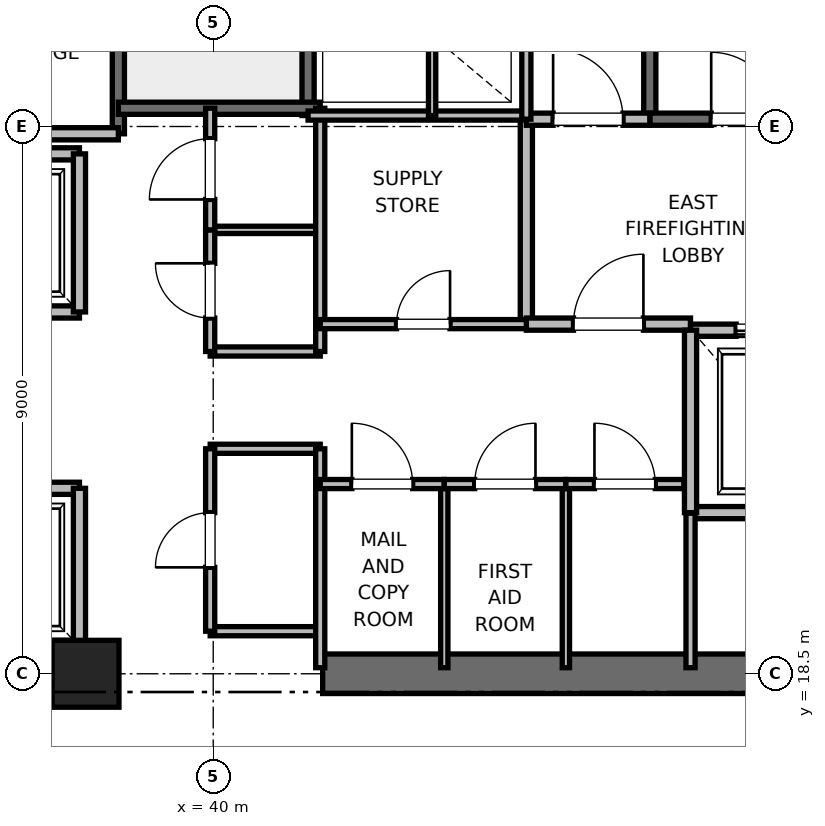
"""IFC4 building model, lengths in metres.
Left out: names, types, materials, properties, quantities, classifications, styles, units other than length and angle.
Written with IfcOpenShell. Run it as: python <this file> out.ifc"""

import sys

from ifc_helpers import new_model, si_unit, direction, frame, frame_2d, origin, origin_2d, place, context, subcontext, project, spatial, rectangle, extrude, element, fill, save


model = new_model("IFC4")
c1 = context("Model", 3, precision=1e-05, world=origin(), true_north=direction((0.0, 1.0)))
c2 = subcontext(c1, "Body", "Model", "MODEL_VIEW")
j1 = project(units=[si_unit("LENGTHUNIT", "METRE"), si_unit("PLANEANGLEUNIT", "RADIAN")], contexts=[c1])
p1 = place(None, origin())
s1 = spatial("IfcSite", under=j1, at=p1, CompositionType="ELEMENT")
p2 = place(p1, origin())
s2 = spatial("IfcBuilding", under=s1, at=p2, CompositionType="ELEMENT")
p3 = place(p2, frame((0.0, 0.0, 99.6)))
s3 = spatial("IfcBuildingStorey", under=s2, at=p3, CompositionType="ELEMENT", Elevation=99.6)
p4 = place(p3, frame((37.9, 18.5, 0.0), z_axis=(0.0, 0.0, 1.0), x_axis=(1.0, 0.0, 0.0)))
e1 = element("IfcColumn", 1, at=p4, inside=s3, PredefinedType="PILASTER", context=c2, shape_type="SweptSolid", body=[
    extrude(rectangle(XDim=1.1, YDim=1.1, at=origin_2d()), origin(), (0.0, 0.0, 1.0), 4.0),
])
for number, where, z_axis, x_axis in (
    (2, (29.0, 18.5, 0.0), (0.0, 0.0, 1.0), (1.0, 0.0, 0.0)),
    (3, (41.8, 18.5, 0.0), (0.0, 0.0, 1.0), (1.0, 0.0, 0.0)),
):
    element("IfcWall", number, at=place(p3, frame(where, z_axis=z_axis, x_axis=x_axis)), inside=s3, PredefinedType="SHEAR", context=c2, shape_type="SweptSolid", body=[
        extrude(rectangle(XDim=9.2, YDim=0.65, at=frame_2d((4.6, 0.0))), origin(), (0.0, 0.0, 1.0), 3.76),
    ])
p5 = place(p3, frame((47.18, 27.62, 0.0), z_axis=(0.0, 0.0, 1.0), x_axis=(0.0, 1.0, 0.0)))
e4 = element("IfcWall", 4, at=p5, inside=s3, PredefinedType="SOLIDWALL", context=c2, shape_type="SweptSolid", body=[
    extrude(rectangle(XDim=8.18, YDim=0.2, at=frame_2d((4.09, 0.0))), origin(), (0.0, 0.0, 1.0), 3.76),
])
p6 = place(p3, frame((47.18, 27.62, 0.0), z_axis=(0.0, 0.0, 1.0), x_axis=(1.0, 0.0, 0.0)))
e5 = element("IfcWall", 5, at=p6, inside=s3, PredefinedType="SOLIDWALL", context=c2, shape_type="SweptSolid", body=[
    extrude(rectangle(XDim=3.12, YDim=0.2, at=frame_2d((1.56, 0.0))), origin(), (0.0, 0.0, 1.0), 3.76),
])
p7 = place(p6, frame((1.01, 0.0, 0.0)))
e6 = element("IfcOpeningElement", 6, at=p7, cuts=e5, PredefinedType="OPENING", context=c2, shape_type="SweptSolid", body=[
    extrude(rectangle(XDim=1.1, YDim=2.15, at=frame_2d((0.55, 1.075))), frame((0.0, 0.1, 0.0), z_axis=(0.0, -1.0, 0.0), x_axis=(1.0, 0.0, 0.0)), (0.0, 0.0, 1.0), 0.2),
])
p8 = place(p3, frame((38.44, 27.38, 0.0), z_axis=(0.0, 0.0, 1.0), x_axis=(0.0, 1.0, 0.0)))
e7 = element("IfcWall", 7, at=p8, inside=s3, PredefinedType="SOLIDWALL", context=c2, shape_type="SweptSolid", body=[
    extrude(rectangle(XDim=8.87, YDim=0.2, at=frame_2d((4.435, 0.0))), origin(), (0.0, 0.0, 1.0), 3.76),
])
p9 = place(p3, frame((41.56, 27.68, 0.0), z_axis=(0.0, 0.0, 1.0), x_axis=(0.0, 1.0, 0.0)))
e8 = element("IfcWall", 8, at=p9, inside=s3, PredefinedType="SOLIDWALL", context=c2, shape_type="SweptSolid", body=[
    extrude(rectangle(XDim=8.57, YDim=0.2, at=frame_2d((4.285, 0.0))), origin(), (0.0, 0.0, 1.0), 3.76),
])
p10 = place(p3, frame((38.44, 27.8, 0.0), z_axis=(0.0, 0.0, 1.0), x_axis=(1.0, 0.0, 0.0)))
e9 = element("IfcWall", 9, at=p10, inside=s3, PredefinedType="SOLIDWALL", context=c2, shape_type="SweptSolid", body=[
    extrude(rectangle(XDim=3.32, YDim=0.2, at=frame_2d((1.66, 0.0))), origin(), (0.0, 0.0, 1.0), 3.76),
])
p11 = place(p3, frame((32.82, 27.38, 0.0), z_axis=(0.0, 0.0, 1.0), x_axis=(1.0, 0.0, 0.0)))
e10 = element("IfcWall", 10, at=p11, inside=s3, PredefinedType="PARTITIONING", context=c2, shape_type="SweptSolid", body=[
    extrude(rectangle(XDim=5.62, YDim=0.2, at=frame_2d((2.81, 0.0))), origin(), (0.0, 0.0, 1.0), 3.76),
])
p12 = place(p3, frame((45.15, 24.25, 0.0), z_axis=(0.0, 0.0, 1.0), x_axis=(0.0, 1.0, 0.0)))
e11 = element("IfcWall", 11, at=p12, inside=s3, PredefinedType="PARTITIONING", context=c2, shape_type="SweptSolid", body=[
    extrude(rectangle(XDim=3.37, YDim=0.2, at=frame_2d((1.685, 0.0))), origin(), (0.0, 0.0, 1.0), 3.76),
])
p13 = place(p3, frame((45.15, 24.25, 0.0), z_axis=(0.0, 0.0, 1.0), x_axis=(1.0, 0.0, 0.0)))
e12 = element("IfcWall", 12, at=p13, inside=s3, PredefinedType="PARTITIONING", context=c2, shape_type="SweptSolid", body=[
    extrude(rectangle(XDim=2.7, YDim=0.2, at=frame_2d((1.35, 0.0))), origin(), (0.0, 0.0, 1.0), 3.76),
])
p14 = place(p13, frame((0.775, 0.0, 0.0)))
e13 = element("IfcOpeningElement", 13, at=p14, cuts=e12, PredefinedType="OPENING", context=c2, shape_type="SweptSolid", body=[
    extrude(rectangle(XDim=1.15, YDim=2.2, at=frame_2d((0.575, 1.1))), frame((0.0, 0.1, 0.0), z_axis=(0.0, -1.0, 0.0), x_axis=(1.0, 0.0, 0.0)), (0.0, 0.0, 1.0), 0.2),
])
p15 = place(p3, frame((45.15, 27.62, 0.0), z_axis=(0.0, 0.0, 1.0), x_axis=(1.0, 0.0, 0.0)))
e14 = element("IfcWall", 14, at=p15, inside=s3, PredefinedType="PARTITIONING", context=c2, shape_type="SweptSolid", body=[
    extrude(rectangle(XDim=2.03, YDim=0.2, at=frame_2d((1.015, 0.0))), origin(), (0.0, 0.0, 1.0), 3.76),
])
p16 = place(p15, frame((0.44, 0.0, 0.0)))
e15 = element("IfcOpeningElement", 15, at=p16, cuts=e14, PredefinedType="OPENING", context=c2, shape_type="SweptSolid", body=[
    extrude(rectangle(XDim=1.15, YDim=2.2, at=frame_2d((0.575, 1.1))), frame((0.0, 0.1, 0.0), z_axis=(0.0, -1.0, 0.0), x_axis=(1.0, 0.0, 0.0)), (0.0, 0.0, 1.0), 0.2),
])
p17 = place(p3, frame((47.85, 21.15, 0.0), z_axis=(0.0, 0.0, 1.0), x_axis=(1.0, 0.0, 0.0)))
e16 = element("IfcWall", 16, at=p17, inside=s3, PredefinedType="SOLIDWALL", context=c2, shape_type="SweptSolid", body=[
    extrude(rectangle(XDim=2.6, YDim=0.2, at=frame_2d((1.3, 0.0))), origin(), (0.0, 0.0, 1.0), 3.76),
])
p18 = place(p3, frame((50.45, 24.15, 0.0), z_axis=(0.0, 0.0, 1.0), x_axis=(-1.0, 0.0, 0.0)))
e17 = element("IfcWall", 17, at=p18, inside=s3, PredefinedType="SOLIDWALL", context=c2, shape_type="SweptSolid", body=[
    extrude(rectangle(XDim=2.6, YDim=0.2, at=frame_2d((1.3, 0.0))), origin(), (0.0, 0.0, 1.0), 2.54),
])
p19 = place(p18, frame((0.75, 0.0, 0.0)))
e18 = element("IfcOpeningElement", 18, at=p19, cuts=e17, PredefinedType="OPENING", context=c2, shape_type="SweptSolid", body=[
    extrude(rectangle(XDim=1.1, YDim=2.2, at=frame_2d((0.55, 1.1))), frame((0.0, 0.1, 0.0), z_axis=(0.0, -1.0, 0.0), x_axis=(1.0, 0.0, 0.0)), (0.0, 0.0, 1.0), 0.2),
])
p20 = place(p3, frame((47.85, 24.15, 0.0), z_axis=(0.0, 0.0, 1.0), x_axis=(0.0, -1.0, 0.0)))
e19 = element("IfcWall", 19, at=p20, inside=s3, PredefinedType="SOLIDWALL", context=c2, shape_type="SweptSolid", body=[
    extrude(rectangle(XDim=3.0, YDim=0.2, at=frame_2d((1.5, 0.0))), origin(), (0.0, 0.0, 1.0), 3.76),
])
p21 = place(p3, frame((35.5, 18.95, 0.0), z_axis=(0.0, 0.0, 1.0), x_axis=(1.0, 0.0, 0.0)))
e20 = element("IfcWall", 20, at=p21, inside=s3, PredefinedType="SOLIDWALL", context=c2, shape_type="SweptSolid", body=[
    extrude(rectangle(XDim=2.3, YDim=0.2, at=frame_2d((1.15, 0.0))), origin(), (0.0, 0.0, 1.0), 2.54),
])
p22 = place(p3, frame((37.8, 21.55, 0.0), z_axis=(0.0, 0.0, 1.0), x_axis=(-1.0, 0.0, 0.0)))
e21 = element("IfcWall", 21, at=p22, inside=s3, PredefinedType="SOLIDWALL", context=c2, shape_type="SweptSolid", body=[
    extrude(rectangle(XDim=2.3, YDim=0.2, at=frame_2d((1.15, 0.0))), origin(), (0.0, 0.0, 1.0), 3.76),
])
p23 = place(p22, frame((0.6, 0.0, 0.0)))
e22 = element("IfcOpeningElement", 22, at=p23, cuts=e21, PredefinedType="OPENING", context=c2, shape_type="SweptSolid", body=[
    extrude(rectangle(XDim=1.1, YDim=2.2, at=frame_2d((0.55, 1.1))), frame((0.0, 0.1, 0.0), z_axis=(0.0, -1.0, 0.0), x_axis=(1.0, 0.0, 0.0)), (0.0, 0.0, 1.0), 0.2),
])
p24 = place(p3, frame((37.8, 18.95, 0.0), z_axis=(0.0, 0.0, 1.0), x_axis=(0.0, 1.0, 0.0)))
e23 = element("IfcWall", 23, at=p24, inside=s3, PredefinedType="SOLIDWALL", context=c2, shape_type="SweptSolid", body=[
    extrude(rectangle(XDim=2.6, YDim=0.2, at=frame_2d((1.3, 0.0))), origin(), (0.0, 0.0, 1.0), 2.54),
])
p25 = place(p3, frame((35.5, 24.45, 0.0), z_axis=(0.0, 0.0, 1.0), x_axis=(1.0, 0.0, 0.0)))
e24 = element("IfcWall", 24, at=p25, inside=s3, PredefinedType="SOLIDWALL", context=c2, shape_type="SweptSolid", body=[
    extrude(rectangle(XDim=2.3, YDim=0.2, at=frame_2d((1.15, 0.0))), origin(), (0.0, 0.0, 1.0), 3.76),
])
p26 = place(p25, frame((0.6, 0.0, 0.0)))
e25 = element("IfcOpeningElement", 25, at=p26, cuts=e24, PredefinedType="OPENING", context=c2, shape_type="SweptSolid", body=[
    extrude(rectangle(XDim=1.1, YDim=2.2, at=frame_2d((0.55, 1.1))), frame((0.0, 0.1, 0.0), z_axis=(0.0, -1.0, 0.0), x_axis=(1.0, 0.0, 0.0)), (0.0, 0.0, 1.0), 0.2),
])
p27 = place(p3, frame((37.8, 27.05, 0.0), z_axis=(0.0, 0.0, 1.0), x_axis=(-1.0, 0.0, 0.0)))
e26 = element("IfcWall", 26, at=p27, inside=s3, PredefinedType="SOLIDWALL", context=c2, shape_type="SweptSolid", body=[
    extrude(rectangle(XDim=2.3, YDim=0.2, at=frame_2d((1.15, 0.0))), origin(), (0.0, 0.0, 1.0), 3.76),
])
p28 = place(p3, frame((37.8, 24.45, 0.0), z_axis=(0.0, 0.0, 1.0), x_axis=(0.0, 1.0, 0.0)))
e27 = element("IfcWall", 27, at=p28, inside=s3, PredefinedType="SOLIDWALL", context=c2, shape_type="SweptSolid", body=[
    extrude(rectangle(XDim=2.6, YDim=0.2, at=frame_2d((1.3, 0.0))), origin(), (0.0, 0.0, 1.0), 3.76),
])
for number, where, z_axis, x_axis in (
    (28, (39.95, 19.2, 0.0), (0.0, 0.0, 1.0), (1.0, 0.0, 0.0)),
    (29, (39.95, 22.2, 0.0), (0.0, 0.0, 1.0), (1.0, 0.0, 0.0)),
    (30, (39.95, 23.8, 0.0), (0.0, 0.0, 1.0), (1.0, 0.0, 0.0)),
):
    element("IfcWall", number, at=place(p3, frame(where, z_axis=z_axis, x_axis=x_axis)), inside=s3, PredefinedType="PARTITIONING", context=c2, shape_type="SweptSolid", body=[
        extrude(rectangle(XDim=1.81, YDim=0.15, at=frame_2d((0.905, 0.0))), origin(), (0.0, 0.0, 1.0), 2.85),
    ])
p29 = place(p3, frame((39.95, 25.8, 0.0), z_axis=(0.0, 0.0, 1.0), x_axis=(1.0, 0.0, 0.0)))
e31 = element("IfcWall", 31, at=p29, inside=s3, PredefinedType="PARTITIONING", context=c2, shape_type="SweptSolid", body=[
    extrude(rectangle(XDim=1.81, YDim=0.12, at=frame_2d((0.905, 0.0))), origin(), (0.0, 0.0, 1.0), 2.85),
])
p30 = place(p3, frame((41.76, 18.6, 0.0), z_axis=(0.0, 0.0, 1.0), x_axis=(0.0, 1.0, 0.0)))
e32 = element("IfcWall", 32, at=p30, inside=s3, PredefinedType="PARTITIONING", context=c2, shape_type="SweptSolid", body=[
    extrude(rectangle(XDim=3.6, YDim=0.15, at=frame_2d((1.8, 0.0))), origin(), (0.0, 0.0, 1.0), 2.54),
])
p31 = place(p3, frame((41.76, 23.8, 0.0), z_axis=(0.0, 0.0, 1.0), x_axis=(0.0, 1.0, 0.0)))
e33 = element("IfcWall", 33, at=p31, inside=s3, PredefinedType="PARTITIONING", context=c2, shape_type="SweptSolid", body=[
    extrude(rectangle(XDim=4.0, YDim=0.15, at=frame_2d((2.0, 0.0))), origin(), (0.0, 0.0, 1.0), 2.85),
])
p32 = place(p3, frame((39.95, 19.2, 0.0), z_axis=(0.0, 0.0, 1.0), x_axis=(0.0, 1.0, 0.0)))
e34 = element("IfcWall", 34, at=p32, inside=s3, PredefinedType="PARTITIONING", context=c2, shape_type="SweptSolid", body=[
    extrude(rectangle(XDim=3.0, YDim=0.15, at=frame_2d((1.5, 0.0))), origin(), (0.0, 0.0, 1.0), 2.85),
])
p33 = place(p32, frame((1.05, 0.0, 0.0)))
e35 = element("IfcOpeningElement", 35, at=p33, cuts=e34, PredefinedType="OPENING", context=c2, shape_type="SweptSolid", body=[
    extrude(rectangle(XDim=0.9, YDim=2.1, at=frame_2d((0.45, 1.05))), frame((0.0, 0.075, 0.0), z_axis=(0.0, -1.0, 0.0), x_axis=(1.0, 0.0, 0.0)), (0.0, 0.0, 1.0), 0.15),
])
p34 = place(p3, frame((39.95, 23.8, 0.0), z_axis=(0.0, 0.0, 1.0), x_axis=(0.0, 1.0, 0.0)))
e36 = element("IfcWall", 36, at=p34, inside=s3, PredefinedType="PARTITIONING", context=c2, shape_type="SweptSolid", body=[
    extrude(rectangle(XDim=2.0, YDim=0.15, at=frame_2d((1.0, 0.0))), origin(), (0.0, 0.0, 1.0), 2.85),
])
p35 = place(p34, frame((0.55, 0.0, 0.0)))
e37 = element("IfcOpeningElement", 37, at=p35, cuts=e36, PredefinedType="OPENING", context=c2, shape_type="SweptSolid", body=[
    extrude(rectangle(XDim=0.9, YDim=2.1, at=frame_2d((0.45, 1.05))), frame((0.0, 0.075, 0.0), z_axis=(0.0, -1.0, 0.0), x_axis=(1.0, 0.0, 0.0)), (0.0, 0.0, 1.0), 0.15),
])
p36 = place(p3, frame((39.95, 25.8, 0.0), z_axis=(0.0, 0.0, 1.0), x_axis=(0.0, 1.0, 0.0)))
e38 = element("IfcWall", 38, at=p36, inside=s3, PredefinedType="PARTITIONING", context=c2, shape_type="SweptSolid", body=[
    extrude(rectangle(XDim=2.0, YDim=0.15, at=frame_2d((1.0, 0.0))), origin(), (0.0, 0.0, 1.0), 2.85),
])
p37 = place(p36, frame((0.5, 0.0, 0.0)))
e39 = element("IfcOpeningElement", 39, at=p37, cuts=e38, PredefinedType="OPENING", context=c2, shape_type="SweptSolid", body=[
    extrude(rectangle(XDim=1.0, YDim=2.15, at=frame_2d((0.5, 1.075))), frame((0.0, 0.075, 0.0), z_axis=(0.0, -1.0, 0.0), x_axis=(1.0, 0.0, 0.0)), (0.0, 0.0, 1.0), 0.15),
])
p38 = place(p3, frame((41.56, 27.68, 0.0), z_axis=(0.0, 0.0, 1.0), x_axis=(1.0, 0.0, 0.0)))
e40 = element("IfcWall", 40, at=p38, inside=s3, PredefinedType="PARTITIONING", context=c2, shape_type="SweptSolid", body=[
    extrude(rectangle(XDim=3.59, YDim=0.15, at=frame_2d((1.795, 0.0))), origin(), (0.0, 0.0, 1.0), 2.85),
])
p39 = place(p3, frame((47.85, 18.6, 0.0), z_axis=(0.0, 0.0, 1.0), x_axis=(0.0, 1.0, 0.0)))
e41 = element("IfcWall", 41, at=p39, inside=s3, PredefinedType="PARTITIONING", context=c2, shape_type="SweptSolid", body=[
    extrude(rectangle(XDim=2.54, YDim=0.15, at=frame_2d((1.27, 0.0))), origin(), (0.0, 0.0, 1.0), 2.85),
])
for number, where, z_axis, x_axis in (
    (42, (43.8, 18.6, 0.0), (0.0, 0.0, 1.0), (0.0, 1.0, 0.0)),
    (43, (45.8, 18.6, 0.0), (0.0, 0.0, 1.0), (0.0, 1.0, 0.0)),
):
    element("IfcWall", number, at=place(p3, frame(where, z_axis=z_axis, x_axis=x_axis)), inside=s3, PredefinedType="PARTITIONING", context=c2, shape_type="SweptSolid", body=[
        extrude(rectangle(XDim=3.02, YDim=0.12, at=frame_2d((1.51, 0.0))), origin(), (0.0, 0.0, 1.0), 2.85),
    ])
p40 = place(p3, frame((41.76, 21.62, 0.0), z_axis=(0.0, 0.0, 1.0), x_axis=(1.0, 0.0, 0.0)))
e44 = element("IfcWall", 44, at=p40, inside=s3, PredefinedType="PARTITIONING", context=c2, shape_type="SweptSolid", body=[
    extrude(rectangle(XDim=2.04, YDim=0.15, at=frame_2d((1.02, 0.0))), origin(), (0.0, 0.0, 1.0), 2.85),
])
p41 = place(p40, frame((0.52, 0.0, 0.0)))
e45 = element("IfcOpeningElement", 45, at=p41, cuts=e44, PredefinedType="OPENING", context=c2, shape_type="SweptSolid", body=[
    extrude(rectangle(XDim=1.0, YDim=2.15, at=frame_2d((0.5, 1.075))), frame((0.0, 0.075, 0.0), z_axis=(0.0, -1.0, 0.0), x_axis=(1.0, 0.0, 0.0)), (0.0, 0.0, 1.0), 0.15),
])
p42 = place(p3, frame((43.8, 21.62, 0.0), z_axis=(0.0, 0.0, 1.0), x_axis=(1.0, 0.0, 0.0)))
e46 = element("IfcWall", 46, at=p42, inside=s3, PredefinedType="PARTITIONING", context=c2, shape_type="SweptSolid", body=[
    extrude(rectangle(XDim=2.0, YDim=0.15, at=frame_2d((1.0, 0.0))), origin(), (0.0, 0.0, 1.0), 2.85),
])
p43 = place(p42, frame((0.5, 0.0, 0.0)))
e47 = element("IfcOpeningElement", 47, at=p43, cuts=e46, PredefinedType="OPENING", context=c2, shape_type="SweptSolid", body=[
    extrude(rectangle(XDim=1.0, YDim=2.15, at=frame_2d((0.5, 1.075))), frame((0.0, 0.075, 0.0), z_axis=(0.0, -1.0, 0.0), x_axis=(1.0, 0.0, 0.0)), (0.0, 0.0, 1.0), 0.15),
])
p44 = place(p3, frame((45.8, 21.62, 0.0), z_axis=(0.0, 0.0, 1.0), x_axis=(1.0, 0.0, 0.0)))
e48 = element("IfcWall", 48, at=p44, inside=s3, PredefinedType="PARTITIONING", context=c2, shape_type="SweptSolid", body=[
    extrude(rectangle(XDim=1.94, YDim=0.15, at=frame_2d((0.97, 0.0))), origin(), (0.0, 0.0, 1.0), 2.85),
])
p45 = place(p44, frame((0.47, 0.0, 0.0)))
e49 = element("IfcOpeningElement", 49, at=p45, cuts=e48, PredefinedType="OPENING", context=c2, shape_type="SweptSolid", body=[
    extrude(rectangle(XDim=1.0, YDim=2.15, at=frame_2d((0.5, 1.075))), frame((0.0, 0.075, 0.0), z_axis=(0.0, -1.0, 0.0), x_axis=(1.0, 0.0, 0.0)), (0.0, 0.0, 1.0), 0.15),
])
p46 = place(p3, frame((41.76, 24.25, 0.0), z_axis=(0.0, 0.0, 1.0), x_axis=(1.0, 0.0, 0.0)))
e50 = element("IfcWall", 50, at=p46, inside=s3, PredefinedType="PARTITIONING", context=c2, shape_type="SweptSolid", body=[
    extrude(rectangle(XDim=3.39, YDim=0.15, at=frame_2d((1.695, 0.0))), origin(), (0.0, 0.0, 1.0), 2.85),
])
p47 = place(p46, frame((1.255, 0.0, 0.0)))
e51 = element("IfcOpeningElement", 51, at=p47, cuts=e50, PredefinedType="OPENING", context=c2, shape_type="SweptSolid", body=[
    extrude(rectangle(XDim=0.88, YDim=2.1, at=frame_2d((0.44, 1.05))), frame((0.0, 0.075, 0.0), z_axis=(0.0, -1.0, 0.0), x_axis=(1.0, 0.0, 0.0)), (0.0, 0.0, 1.0), 0.15),
])
p48 = place(p3, frame((45.15, 27.62, 0.0), z_axis=(0.0, 0.0, 1.0), x_axis=(0.0, 1.0, 0.0)))
e52 = element("IfcWall", 52, at=p48, inside=s3, PredefinedType="PARTITIONING", context=c2, shape_type="SweptSolid", body=[
    extrude(rectangle(XDim=3.1, YDim=0.15, at=frame_2d((1.55, 0.0))), origin(), (0.0, 0.0, 1.0), 2.85),
])
p49 = place(p3, frame((43.6, 27.68, 0.0), z_axis=(0.0, 0.0, 1.0), x_axis=(0.0, 1.0, 0.0)))
e53 = element("IfcWall", 53, at=p49, inside=s3, PredefinedType="PARTITIONING", context=c2, shape_type="SweptSolid", body=[
    extrude(rectangle(XDim=3.04, YDim=0.12, at=frame_2d((1.52, 0.0))), origin(), (0.0, 0.0, 1.0), 2.85),
])
p50 = place(p7, origin())
e54 = element("IfcDoor", 54, at=p50, inside=s3, OperationType="SINGLE_SWING_LEFT", PredefinedType="DOOR", context=c2, shape_type="SweptSolid", body=[
    extrude(rectangle(XDim=1.1, YDim=2.15, at=frame_2d((0.55, 1.075))), frame((0.0, 0.025, 0.0), z_axis=(0.0, -1.0, 0.0), x_axis=(1.0, 0.0, 0.0)), (0.0, 0.0, 1.0), 0.05),
])
fill(e6, e54)
p51 = place(p14, origin())
e55 = element("IfcDoor", 55, at=p51, inside=s3, OperationType="SINGLE_SWING_RIGHT", PredefinedType="DOOR", context=c2, shape_type="SweptSolid", body=[
    extrude(rectangle(XDim=1.15, YDim=2.2, at=frame_2d((0.575, 1.1))), frame((0.0, 0.025, 0.0), z_axis=(0.0, -1.0, 0.0), x_axis=(1.0, 0.0, 0.0)), (0.0, 0.0, 1.0), 0.05),
])
fill(e13, e55)
p52 = place(p16, origin())
e56 = element("IfcDoor", 56, at=p52, inside=s3, OperationType="SINGLE_SWING_LEFT", PredefinedType="DOOR", context=c2, shape_type="SweptSolid", body=[
    extrude(rectangle(XDim=1.15, YDim=2.2, at=frame_2d((0.575, 1.1))), frame((0.0, 0.025, 0.0), z_axis=(0.0, -1.0, 0.0), x_axis=(1.0, 0.0, 0.0)), (0.0, 0.0, 1.0), 0.05),
])
fill(e15, e56)
p53 = place(p19, origin())
e57 = element("IfcDoor", 57, at=p53, inside=s3, OperationType="SLIDING_TO_RIGHT", PredefinedType="DOOR", context=c2, shape_type="SweptSolid", body=[
    extrude(rectangle(XDim=1.1, YDim=2.2, at=frame_2d((0.55, 1.1))), frame((0.0, 0.025, 0.0), z_axis=(0.0, -1.0, 0.0), x_axis=(1.0, 0.0, 0.0)), (0.0, 0.0, 1.0), 0.05),
])
fill(e18, e57)
p54 = place(p33, origin())
e58 = element("IfcDoor", 58, at=p54, inside=s3, OperationType="SINGLE_SWING_LEFT", PredefinedType="DOOR", context=c2, shape_type="SweptSolid", body=[
    extrude(rectangle(XDim=0.9, YDim=2.1, at=frame_2d((0.45, 1.05))), frame((0.0, 0.025, 0.0), z_axis=(0.0, -1.0, 0.0), x_axis=(1.0, 0.0, 0.0)), (0.0, 0.0, 1.0), 0.05),
])
fill(e35, e58)
p55 = place(p35, origin())
e59 = element("IfcDoor", 59, at=p55, inside=s3, OperationType="SINGLE_SWING_RIGHT", PredefinedType="DOOR", context=c2, shape_type="SweptSolid", body=[
    extrude(rectangle(XDim=0.9, YDim=2.1, at=frame_2d((0.45, 1.05))), frame((0.0, 0.025, 0.0), z_axis=(0.0, -1.0, 0.0), x_axis=(1.0, 0.0, 0.0)), (0.0, 0.0, 1.0), 0.05),
])
fill(e37, e59)
p56 = place(p37, origin())
e60 = element("IfcDoor", 60, at=p56, inside=s3, OperationType="SINGLE_SWING_LEFT", PredefinedType="DOOR", context=c2, shape_type="SweptSolid", body=[
    extrude(rectangle(XDim=1.0, YDim=2.15, at=frame_2d((0.5, 1.075))), frame((0.0, 0.025, 0.0), z_axis=(0.0, -1.0, 0.0), x_axis=(1.0, 0.0, 0.0)), (0.0, 0.0, 1.0), 0.05),
])
fill(e39, e60)
p57 = place(p41, origin())
e61 = element("IfcDoor", 61, at=p57, inside=s3, OperationType="SINGLE_SWING_LEFT", PredefinedType="DOOR", context=c2, shape_type="SweptSolid", body=[
    extrude(rectangle(XDim=1.0, YDim=2.15, at=frame_2d((0.5, 1.075))), frame((0.0, 0.025, 0.0), z_axis=(0.0, -1.0, 0.0), x_axis=(1.0, 0.0, 0.0)), (0.0, 0.0, 1.0), 0.05),
])
fill(e45, e61)
p58 = place(p43, origin())
e62 = element("IfcDoor", 62, at=p58, inside=s3, OperationType="SINGLE_SWING_RIGHT", PredefinedType="DOOR", context=c2, shape_type="SweptSolid", body=[
    extrude(rectangle(XDim=1.0, YDim=2.15, at=frame_2d((0.5, 1.075))), frame((0.0, 0.025, 0.0), z_axis=(0.0, -1.0, 0.0), x_axis=(1.0, 0.0, 0.0)), (0.0, 0.0, 1.0), 0.05),
])
fill(e47, e62)
p59 = place(p45, origin())
e63 = element("IfcDoor", 63, at=p59, inside=s3, OperationType="SINGLE_SWING_LEFT", PredefinedType="DOOR", context=c2, shape_type="SweptSolid", body=[
    extrude(rectangle(XDim=1.0, YDim=2.15, at=frame_2d((0.5, 1.075))), frame((0.0, 0.025, 0.0), z_axis=(0.0, -1.0, 0.0), x_axis=(1.0, 0.0, 0.0)), (0.0, 0.0, 1.0), 0.05),
])
fill(e49, e63)
p60 = place(p47, origin())
e64 = element("IfcDoor", 64, at=p60, inside=s3, OperationType="SINGLE_SWING_RIGHT", PredefinedType="DOOR", context=c2, shape_type="SweptSolid", body=[
    extrude(rectangle(XDim=0.88, YDim=2.1, at=frame_2d((0.44, 1.05))), frame((0.0, 0.025, 0.0), z_axis=(0.0, -1.0, 0.0), x_axis=(1.0, 0.0, 0.0)), (0.0, 0.0, 1.0), 0.05),
])
fill(e51, e64)
save(model, sys.argv[1])
